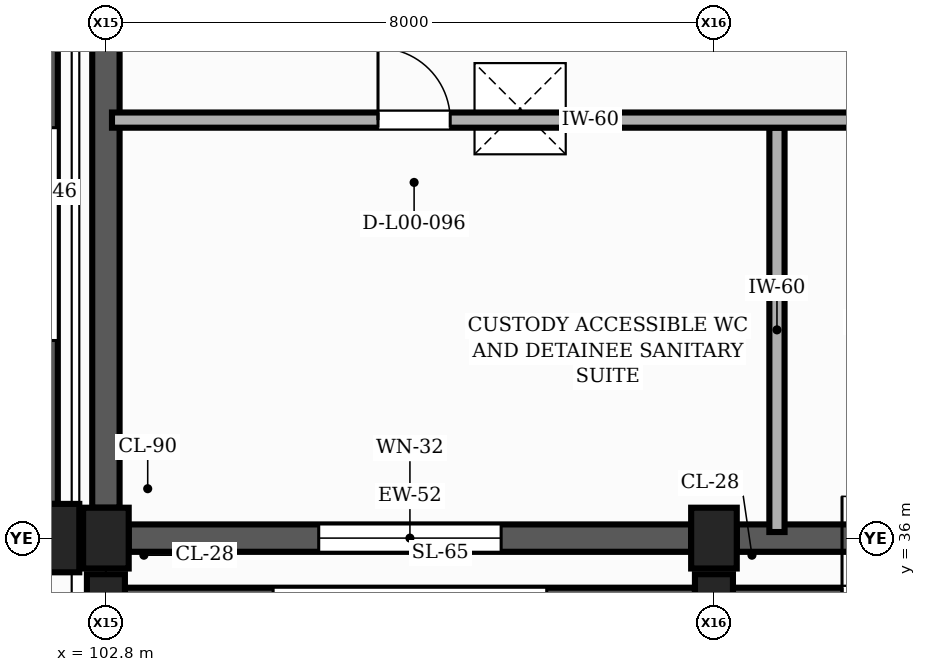
"""IFC4 building model, lengths in metres.
Left out: names, types, materials, properties, quantities, classifications, styles, units other than length and angle.
Written with IfcOpenShell. Run it as: python <this file> out.ifc"""

import sys

from ifc_helpers import new_model, si_unit, direction, frame, frame_2d, origin, origin_2d, place, context, subcontext, project, spatial, rectangle, extrude, element, fill, save


model = new_model("IFC4")
c1 = context("Model", 3, precision=1e-05, world=origin(), true_north=direction((0.0, 1.0)))
c2 = subcontext(c1, "Body", "Model", "MODEL_VIEW")
j1 = project(units=[si_unit("LENGTHUNIT", "METRE"), si_unit("PLANEANGLEUNIT", "RADIAN")], contexts=[c1])
p1 = place(None, origin())
s1 = spatial("IfcSite", under=j1, at=p1, CompositionType="ELEMENT")
p2 = place(p1, origin())
s2 = spatial("IfcBuilding", under=s1, at=p2, CompositionType="ELEMENT")
p3 = place(p2, origin())
s3 = spatial("IfcBuildingStorey", under=s2, at=p3, CompositionType="ELEMENT", Elevation=0.0)
p4 = place(p3, frame((102.0, 36.0, 0.0), z_axis=(0.0, 0.0, 1.0), x_axis=(1.0, 0.0, 0.0)))
e1 = element("IfcColumn", 1, at=p4, inside=s3, PredefinedType="COLUMN", context=c2, shape_type="SweptSolid", body=[
    extrude(rectangle(XDim=0.9, YDim=0.9, at=origin_2d()), origin(), (0.0, 0.0, 1.0), 4.8),
])
p5 = place(p3, frame((102.8, 35.2, -0.5), z_axis=(0.0, 0.0, 1.0), x_axis=(1.0, 0.0, 0.0)))
e2 = element("IfcColumn", 2, at=p5, inside=s3, PredefinedType="COLUMN", context=c2, shape_type="SweptSolid", body=[
    extrude(rectangle(XDim=0.5, YDim=0.65, at=origin_2d()), origin(), (0.0, 0.0, 1.0), 5.3),
])
p6 = place(p3, frame((102.8, 36.0, -0.5), z_axis=(0.0, 0.0, 1.0), x_axis=(1.0, 0.0, 0.0)))
e3 = element("IfcColumn", 3, at=p6, inside=s3, PredefinedType="COLUMN", context=c2, shape_type="SweptSolid", body=[
    extrude(rectangle(XDim=0.6, YDim=0.8, at=origin_2d()), origin(), (0.0, 0.0, 1.0), 5.3),
])
p7 = place(p3, frame((110.8, 35.2, -0.5), z_axis=(0.0, 0.0, 1.0), x_axis=(1.0, 0.0, 0.0)))
e4 = element("IfcColumn", 4, at=p7, inside=s3, PredefinedType="COLUMN", context=c2, shape_type="SweptSolid", body=[
    extrude(rectangle(XDim=0.5, YDim=0.65, at=origin_2d()), origin(), (0.0, 0.0, 1.0), 5.3),
])
p8 = place(p3, frame((110.8, 36.0, -0.5), z_axis=(0.0, 0.0, 1.0), x_axis=(1.0, 0.0, 0.0)))
e5 = element("IfcColumn", 5, at=p8, inside=s3, PredefinedType="COLUMN", context=c2, shape_type="SweptSolid", body=[
    extrude(rectangle(XDim=0.6, YDim=0.8, at=origin_2d()), origin(), (0.0, 0.0, 1.0), 5.3),
])
p9 = place(p3, frame((102.0, 36.45, -0.42), z_axis=(0.0, 0.0, 1.0), x_axis=(0.0, 1.0, 0.0)))
e6 = element("IfcWall", 6, at=p9, inside=s3, PredefinedType="SOLIDWALL", context=c2, shape_type="SweptSolid", body=[
    extrude(rectangle(XDim=7.1, YDim=0.335, at=frame_2d((3.55, 0.0))), origin(), (0.0, 0.0, 1.0), 4.3),
])
p10 = place(p9, frame((2.15, 0.0, 1.32)))
e7 = element("IfcOpeningElement", 7, at=p10, cuts=e6, PredefinedType="OPENING", context=c2, shape_type="SweptSolid", body=[
    extrude(rectangle(XDim=2.8, YDim=1.8, at=frame_2d((1.4, 0.9))), frame((0.0, 0.177, 0.0), z_axis=(0.0, -1.0, 0.0), x_axis=(1.0, 0.0, 0.0)), (0.0, 0.0, 1.0), 0.355),
])
p11 = place(p3, frame((118.55, 35.2, -0.42), z_axis=(0.0, 0.0, 1.0), x_axis=(-1.0, 0.0, 0.0)))
e8 = element("IfcWall", 8, at=p11, inside=s3, PredefinedType="SOLIDWALL", context=c2, shape_type="SweptSolid", body=[
    extrude(rectangle(XDim=7.5, YDim=0.295, at=frame_2d((3.75, 0.0))), origin(), (0.0, 0.0, 1.0), 4.95),
])
p12 = place(p11, frame((4.715, 0.0, 0.42)))
e9 = element("IfcOpeningElement", 9, at=p12, cuts=e8, PredefinedType="OPENING", context=c2, shape_type="SweptSolid", body=[
    extrude(rectangle(XDim=1.35, YDim=2.15, at=frame_2d((0.675, 1.075))), frame((0.0, 0.157, 0.0), z_axis=(0.0, -1.0, 0.0), x_axis=(1.0, 0.0, 0.0)), (0.0, 0.0, 1.0), 0.315),
])
p13 = place(p3, frame((110.55, 35.2, -0.42), z_axis=(0.0, 0.0, 1.0), x_axis=(-1.0, 0.0, 0.0)))
e10 = element("IfcWall", 10, at=p13, inside=s3, PredefinedType="SOLIDWALL", context=c2, shape_type="SweptSolid", body=[
    extrude(rectangle(XDim=7.5, YDim=0.295, at=frame_2d((3.75, 0.0))), origin(), (0.0, 0.0, 1.0), 4.333),
])
p14 = place(p13, frame((1.95, 0.0, 2.47)))
e11 = element("IfcOpeningElement", 11, at=p14, cuts=e10, PredefinedType="OPENING", context=c2, shape_type="SweptSolid", body=[
    extrude(rectangle(XDim=3.6, YDim=1.2, at=frame_2d((1.8, 0.6))), frame((0.0, 0.157, 0.0), z_axis=(0.0, -1.0, 0.0), x_axis=(1.0, 0.0, 0.0)), (0.0, 0.0, 1.0), 0.315),
])
p15 = place(p3, frame((103.1, 36.0, -0.42), z_axis=(0.0, 0.0, 1.0), x_axis=(1.0, 0.0, 0.0)))
e12 = element("IfcWall", 12, at=p15, inside=s3, PredefinedType="SOLIDWALL", context=c2, shape_type="SweptSolid", body=[
    extrude(rectangle(XDim=7.4, YDim=0.36, at=frame_2d((3.7, 0.0))), origin(), (0.0, 0.0, 1.0), 4.13),
])
p16 = place(p15, frame((2.5, 0.0, 2.52)))
e13 = element("IfcOpeningElement", 13, at=p16, cuts=e12, PredefinedType="OPENING", context=c2, shape_type="SweptSolid", body=[
    extrude(rectangle(XDim=2.4, YDim=0.75, at=frame_2d((1.2, 0.375))), frame((0.0, 0.19, 0.0), z_axis=(0.0, -1.0, 0.0), x_axis=(1.0, 0.0, 0.0)), (0.0, 0.0, 1.0), 0.38),
])
p17 = place(p3, frame((111.1, 36.0, -0.42), z_axis=(0.0, 0.0, 1.0), x_axis=(1.0, 0.0, 0.0)))
e14 = element("IfcWall", 14, at=p17, inside=s3, PredefinedType="SOLIDWALL", context=c2, shape_type="SweptSolid", body=[
    extrude(rectangle(XDim=7.4, YDim=0.36, at=frame_2d((3.7, 0.0))), origin(), (0.0, 0.0, 1.0), 4.13),
])
p18 = place(p3, frame((102.8, 43.6, -0.42), z_axis=(0.0, 0.0, 1.0), x_axis=(0.0, -1.0, 0.0)))
e15 = element("IfcWall", 15, at=p18, inside=s3, PredefinedType="SOLIDWALL", context=c2, shape_type="SweptSolid", body=[
    extrude(rectangle(XDim=7.2, YDim=0.36, at=frame_2d((3.6, 0.0))), origin(), (0.0, 0.0, 1.0), 4.23),
])
p19 = place(p3, frame((111.629, 36.08, 0.0), z_axis=(0.0, 0.0, 1.0), x_axis=(0.0, 1.0, 0.0)))
e16 = element("IfcWall", 16, at=p19, inside=s3, PredefinedType="PARTITIONING", context=c2, shape_type="SweptSolid", body=[
    extrude(rectangle(XDim=5.32, YDim=0.2, at=frame_2d((2.66, 0.0))), origin(), (0.0, 0.0, 1.0), 3.695),
])
p20 = place(p3, frame((102.88, 41.5, 0.0), z_axis=(0.0, 0.0, 1.0), x_axis=(1.0, 0.0, 0.0)))
e17 = element("IfcWall", 17, at=p20, inside=s3, PredefinedType="PARTITIONING", context=c2, shape_type="SweptSolid", body=[
    extrude(rectangle(XDim=43.92, YDim=0.2, at=frame_2d((21.96, 0.0))), origin(), (0.0, 0.0, 1.0), 3.695),
])
p21 = place(p20, frame((3.5, 0.0, 0.0)))
e18 = element("IfcOpeningElement", 18, at=p21, cuts=e17, PredefinedType="OPENING", context=c2, shape_type="SweptSolid", body=[
    extrude(rectangle(XDim=0.95, YDim=2.15, at=frame_2d((0.475, 1.075))), frame((0.0, 0.11, 0.0), z_axis=(0.0, -1.0, 0.0), x_axis=(1.0, 0.0, 0.0)), (0.0, 0.0, 1.0), 0.22),
])
p22 = place(p20, frame((13.0, 0.0, 0.0)))
e19 = element("IfcOpeningElement", 19, at=p22, cuts=e17, PredefinedType="OPENING", context=c2, shape_type="SweptSolid", body=[
    extrude(rectangle(XDim=0.95, YDim=2.2, at=frame_2d((0.475, 1.1))), frame((0.0, 0.11, 0.0), z_axis=(0.0, -1.0, 0.0), x_axis=(1.0, 0.0, 0.0)), (0.0, 0.0, 1.0), 0.22),
])
p23 = place(p20, frame((25.0, 0.0, 0.0)))
e20 = element("IfcOpeningElement", 20, at=p23, cuts=e17, PredefinedType="OPENING", context=c2, shape_type="SweptSolid", body=[
    extrude(rectangle(XDim=0.95, YDim=2.2, at=frame_2d((0.475, 1.1))), frame((0.0, 0.11, 0.0), z_axis=(0.0, -1.0, 0.0), x_axis=(1.0, 0.0, 0.0)), (0.0, 0.0, 1.0), 0.22),
])
p24 = place(p20, frame((37.0, 0.0, 0.0)))
e21 = element("IfcOpeningElement", 21, at=p24, cuts=e17, PredefinedType="OPENING", context=c2, shape_type="SweptSolid", body=[
    extrude(rectangle(XDim=0.95, YDim=2.2, at=frame_2d((0.475, 1.1))), frame((0.0, 0.11, 0.0), z_axis=(0.0, -1.0, 0.0), x_axis=(1.0, 0.0, 0.0)), (0.0, 0.0, 1.0), 0.22),
])
p25 = place(p16, origin())
e22 = element("IfcWindow", 22, at=p25, inside=s3, PartitioningType="SINGLE_PANEL", PredefinedType="WINDOW", context=c2, shape_type="SweptSolid", body=[
    extrude(rectangle(XDim=2.4, YDim=0.75, at=frame_2d((1.2, 0.375))), frame((0.0, 0.03, 0.0), z_axis=(0.0, -1.0, 0.0), x_axis=(1.0, 0.0, 0.0)), (0.0, 0.0, 1.0), 0.06),
])
fill(e13, e22)
p26 = place(p21, origin())
e23 = element("IfcDoor", 23, at=p26, inside=s3, OperationType="SINGLE_SWING_LEFT", PredefinedType="DOOR", context=c2, shape_type="SweptSolid", body=[
    extrude(rectangle(XDim=0.95, YDim=2.15, at=frame_2d((0.475, 1.075))), frame((0.0, 0.025, 0.0), z_axis=(0.0, -1.0, 0.0), x_axis=(1.0, 0.0, 0.0)), (0.0, 0.0, 1.0), 0.05),
])
fill(e18, e23)
save(model, sys.argv[1])
